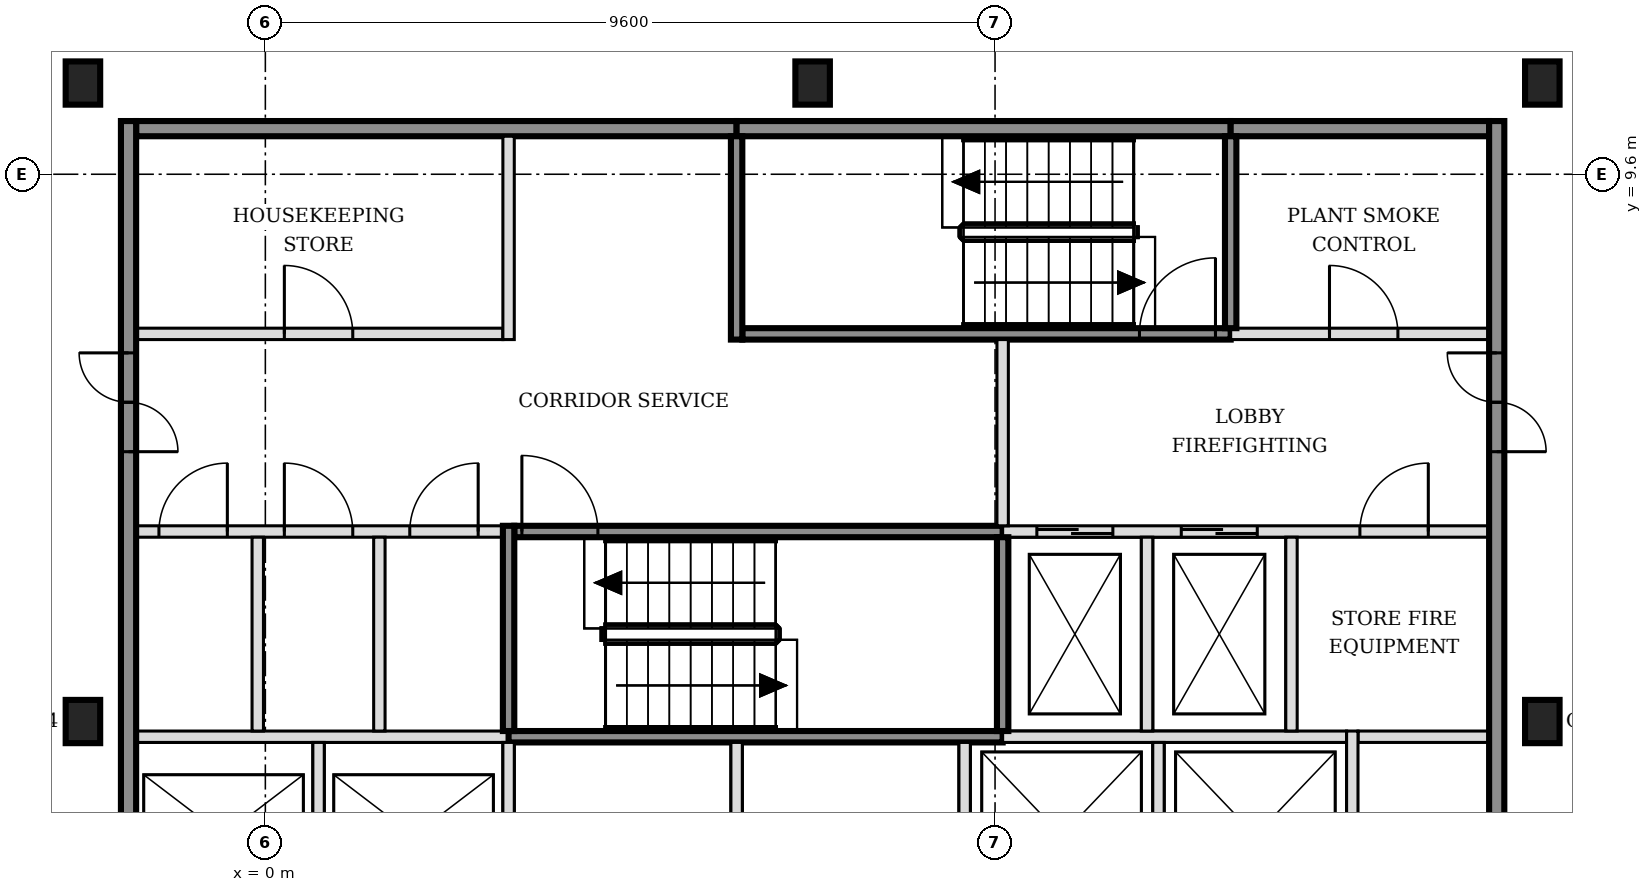
"""IFC4 building model, lengths in metres.
Left out: names, types, materials, properties, quantities, classifications, styles, units other than length and angle.
Written with IfcOpenShell. Run it as: python <this file> out.ifc"""

import sys

from ifc_helpers import new_model, si_unit, direction, frame, frame_2d, origin, origin_2d, place, context, subcontext, project, spatial, rectangle, i_section, extrude, element, fill, save


model = new_model("IFC4")
c1 = context("Model", 3, precision=1e-05, world=origin(), true_north=direction((0.0, 1.0)))
c2 = subcontext(c1, "Body", "Model", "MODEL_VIEW")
j1 = project(units=[si_unit("LENGTHUNIT", "METRE"), si_unit("PLANEANGLEUNIT", "RADIAN")], contexts=[c1])
p1 = place(None, origin())
s1 = spatial("IfcSite", under=j1, at=p1, CompositionType="ELEMENT")
p2 = place(p1, origin())
s2 = spatial("IfcBuilding", under=s1, at=p2, CompositionType="ELEMENT")
p3 = place(p2, frame((0.0, 0.0, 9.0)))
s3 = spatial("IfcBuildingStorey", under=s2, at=p3, CompositionType="ELEMENT", Elevation=9.0)
for number, where, z_axis, x_axis in (
    (1, (-2.4, 2.4, -0.2), (0.0, 0.0, 1.0), (1.0, 0.0, 0.0)),
    (2, (16.8, 2.4, -0.2), (0.0, 0.0, 1.0), (1.0, 0.0, 0.0)),
    (3, (-2.4, 10.8, -0.2), (0.0, 0.0, 1.0), (1.0, 0.0, 0.0)),
    (4, (7.2, 10.8, -0.2), (0.0, 0.0, 1.0), (1.0, 0.0, 0.0)),
    (5, (16.8, 10.8, -0.2), (0.0, 0.0, 1.0), (1.0, 0.0, 0.0)),
):
    element("IfcColumn", number, at=place(p3, frame(where, z_axis=z_axis, x_axis=x_axis)), inside=s3, PredefinedType="COLUMN", context=c2, shape_type="SweptSolid", body=[
        extrude(i_section(OverallWidth=0.454, OverallDepth=0.569, WebThickness=0.078, FlangeThickness=0.125, FilletRadius=0.015, at=origin_2d()), origin(), (0.0, 0.0, 1.0), 6.0),
    ])
p4 = place(p3, frame((-1.7, 2.2, 0.0), z_axis=(0.0, 0.0, 1.0), x_axis=(1.0, 0.0, 0.0)))
e6 = element("IfcWall", 6, at=p4, inside=s3, PredefinedType="SOLIDWALL", context=c2, shape_type="SweptSolid", body=[
    extrude(rectangle(XDim=4.9, YDim=0.15, at=frame_2d((2.45, 0.0))), origin(), (0.0, 0.0, 1.0), 5.8),
])
p5 = place(p3, frame((3.2, 2.2, 0.0), z_axis=(0.0, 0.0, 1.0), x_axis=(1.0, 0.0, 0.0)))
e7 = element("IfcWall", 7, at=p5, inside=s3, PredefinedType="SOLIDWALL", context=c2, shape_type="SweptSolid", body=[
    extrude(rectangle(XDim=6.5, YDim=0.15, at=frame_2d((3.25, 0.0))), origin(), (0.0, 0.0, 1.0), 5.8),
])
p6 = place(p3, frame((9.7, 2.2, 0.0), z_axis=(0.0, 0.0, 1.0), x_axis=(1.0, 0.0, 0.0)))
e8 = element("IfcWall", 8, at=p6, inside=s3, PredefinedType="SOLIDWALL", context=c2, shape_type="SweptSolid", body=[
    extrude(rectangle(XDim=4.525, YDim=0.15, at=frame_2d((2.263, 0.0))), origin(), (0.0, 0.0, 1.0), 5.8),
])
p7 = place(p3, frame((14.375, 2.2, 0.0), z_axis=(0.0, 0.0, 1.0), x_axis=(1.0, 0.0, 0.0)))
e9 = element("IfcWall", 9, at=p7, inside=s3, PredefinedType="PARTITIONING", context=c2, shape_type="SweptSolid", body=[
    extrude(rectangle(XDim=1.725, YDim=0.15, at=frame_2d((0.863, 0.0))), origin(), (0.0, 0.0, 1.0), 5.8),
])
p8 = place(p3, frame((-1.7, 4.9, 0.0), z_axis=(0.0, 0.0, 1.0), x_axis=(1.0, 0.0, 0.0)))
e10 = element("IfcWall", 10, at=p8, inside=s3, PredefinedType="PARTITIONING", context=c2, shape_type="SweptSolid", body=[
    extrude(rectangle(XDim=4.825, YDim=0.15, at=frame_2d((2.413, 0.0))), origin(), (0.0, 0.0, 1.0), 5.8),
])
p9 = place(p8, frame((0.3, 0.0, 0.0)))
e11 = element("IfcOpeningElement", 11, at=p9, cuts=e10, PredefinedType="OPENING", context=c2, shape_type="SweptSolid", body=[
    extrude(rectangle(XDim=0.9, YDim=2.1, at=frame_2d((0.45, 1.05))), frame((0.0, 0.085, 0.0), z_axis=(0.0, -1.0, 0.0), x_axis=(1.0, 0.0, 0.0)), (0.0, 0.0, 1.0), 0.17),
])
p10 = place(p8, frame((1.95, 0.0, 0.0)))
e12 = element("IfcOpeningElement", 12, at=p10, cuts=e10, PredefinedType="OPENING", context=c2, shape_type="SweptSolid", body=[
    extrude(rectangle(XDim=0.9, YDim=2.1, at=frame_2d((0.45, 1.05))), frame((0.0, 0.085, 0.0), z_axis=(0.0, -1.0, 0.0), x_axis=(1.0, 0.0, 0.0)), (0.0, 0.0, 1.0), 0.17),
])
p11 = place(p8, frame((3.6, 0.0, 0.0)))
e13 = element("IfcOpeningElement", 13, at=p11, cuts=e10, PredefinedType="OPENING", context=c2, shape_type="SweptSolid", body=[
    extrude(rectangle(XDim=0.9, YDim=2.1, at=frame_2d((0.45, 1.05))), frame((0.0, 0.085, 0.0), z_axis=(0.0, -1.0, 0.0), x_axis=(1.0, 0.0, 0.0)), (0.0, 0.0, 1.0), 0.17),
])
p12 = place(p3, frame((3.275, 4.9, 0.0), z_axis=(0.0, 0.0, 1.0), x_axis=(1.0, 0.0, 0.0)))
e14 = element("IfcWall", 14, at=p12, inside=s3, PredefinedType="SOLIDWALL", context=c2, shape_type="SweptSolid", body=[
    extrude(rectangle(XDim=6.425, YDim=0.15, at=frame_2d((3.212, 0.0))), origin(), (0.0, 0.0, 1.0), 5.8),
])
p13 = place(p12, frame((0.1, 0.0, 0.0)))
e15 = element("IfcOpeningElement", 15, at=p13, cuts=e14, PredefinedType="OPENING", context=c2, shape_type="SweptSolid", body=[
    extrude(rectangle(XDim=1.0, YDim=2.1, at=frame_2d((0.5, 1.05))), frame((0.0, 0.085, 0.0), z_axis=(0.0, -1.0, 0.0), x_axis=(1.0, 0.0, 0.0)), (0.0, 0.0, 1.0), 0.17),
])
p14 = place(p3, frame((9.7, 4.9, 0.0), z_axis=(0.0, 0.0, 1.0), x_axis=(1.0, 0.0, 0.0)))
e16 = element("IfcWall", 16, at=p14, inside=s3, PredefinedType="SOLIDWALL", context=c2, shape_type="SweptSolid", body=[
    extrude(rectangle(XDim=6.4, YDim=0.15, at=frame_2d((3.2, 0.0))), origin(), (0.0, 0.0, 1.0), 5.8),
])
p15 = place(p14, frame((0.45, 0.0, 0.0)))
e17 = element("IfcOpeningElement", 17, at=p15, cuts=e16, PredefinedType="OPENING", context=c2, shape_type="SweptSolid", body=[
    extrude(rectangle(XDim=1.0, YDim=2.1, at=frame_2d((0.5, 1.05))), frame((0.0, 0.085, 0.0), z_axis=(0.0, -1.0, 0.0), x_axis=(1.0, 0.0, 0.0)), (0.0, 0.0, 1.0), 0.17),
])
p16 = place(p14, frame((2.35, 0.0, 0.0)))
e18 = element("IfcOpeningElement", 18, at=p16, cuts=e16, PredefinedType="OPENING", context=c2, shape_type="SweptSolid", body=[
    extrude(rectangle(XDim=1.0, YDim=2.1, at=frame_2d((0.5, 1.05))), frame((0.0, 0.085, 0.0), z_axis=(0.0, -1.0, 0.0), x_axis=(1.0, 0.0, 0.0)), (0.0, 0.0, 1.0), 0.17),
])
p17 = place(p14, frame((4.7, 0.0, 0.0)))
e19 = element("IfcOpeningElement", 19, at=p17, cuts=e16, PredefinedType="OPENING", context=c2, shape_type="SweptSolid", body=[
    extrude(rectangle(XDim=0.9, YDim=2.1, at=frame_2d((0.45, 1.05))), frame((0.0, 0.085, 0.0), z_axis=(0.0, -1.0, 0.0), x_axis=(1.0, 0.0, 0.0)), (0.0, 0.0, 1.0), 0.17),
])
p18 = place(p3, frame((-1.7, 7.5, 0.0), z_axis=(0.0, 0.0, 1.0), x_axis=(1.0, 0.0, 0.0)))
e20 = element("IfcWall", 20, at=p18, inside=s3, PredefinedType="PARTITIONING", context=c2, shape_type="SweptSolid", body=[
    extrude(rectangle(XDim=4.825, YDim=0.15, at=frame_2d((2.413, 0.0))), origin(), (0.0, 0.0, 1.0), 5.8),
])
p19 = place(p18, frame((1.95, 0.0, 0.0)))
e21 = element("IfcOpeningElement", 21, at=p19, cuts=e20, PredefinedType="OPENING", context=c2, shape_type="SweptSolid", body=[
    extrude(rectangle(XDim=0.9, YDim=2.1, at=frame_2d((0.45, 1.05))), frame((0.0, 0.085, 0.0), z_axis=(0.0, -1.0, 0.0), x_axis=(1.0, 0.0, 0.0)), (0.0, 0.0, 1.0), 0.17),
])
p20 = place(p3, frame((6.275, 7.5, 0.0), z_axis=(0.0, 0.0, 1.0), x_axis=(1.0, 0.0, 0.0)))
e22 = element("IfcWall", 22, at=p20, inside=s3, PredefinedType="SOLIDWALL", context=c2, shape_type="SweptSolid", body=[
    extrude(rectangle(XDim=6.425, YDim=0.15, at=frame_2d((3.212, 0.0))), origin(), (0.0, 0.0, 1.0), 5.8),
])
p21 = place(p20, frame((5.225, 0.0, 0.0)))
e23 = element("IfcOpeningElement", 23, at=p21, cuts=e22, PredefinedType="OPENING", context=c2, shape_type="SweptSolid", body=[
    extrude(rectangle(XDim=1.0, YDim=2.1, at=frame_2d((0.5, 1.05))), frame((0.0, 0.085, 0.0), z_axis=(0.0, -1.0, 0.0), x_axis=(1.0, 0.0, 0.0)), (0.0, 0.0, 1.0), 0.17),
])
p22 = place(p3, frame((12.7, 7.5, 0.0), z_axis=(0.0, 0.0, 1.0), x_axis=(1.0, 0.0, 0.0)))
e24 = element("IfcWall", 24, at=p22, inside=s3, PredefinedType="SOLIDWALL", context=c2, shape_type="SweptSolid", body=[
    extrude(rectangle(XDim=3.4, YDim=0.15, at=frame_2d((1.7, 0.0))), origin(), (0.0, 0.0, 1.0), 5.8),
])
p23 = place(p22, frame((1.3, 0.0, 0.0)))
e25 = element("IfcOpeningElement", 25, at=p23, cuts=e24, PredefinedType="OPENING", context=c2, shape_type="SweptSolid", body=[
    extrude(rectangle(XDim=0.9, YDim=2.1, at=frame_2d((0.45, 1.05))), frame((0.0, 0.085, 0.0), z_axis=(0.0, -1.0, 0.0), x_axis=(1.0, 0.0, 0.0)), (0.0, 0.0, 1.0), 0.17),
])
p24 = place(p3, frame((-1.7, 10.2, 0.0), z_axis=(0.0, 0.0, 1.0), x_axis=(1.0, 0.0, 0.0)))
e26 = element("IfcWall", 26, at=p24, inside=s3, PredefinedType="SOLIDWALL", context=c2, shape_type="SweptSolid", body=[
    extrude(rectangle(XDim=7.9, YDim=0.2, at=frame_2d((3.95, 0.0))), origin(), (0.0, 0.0, 1.0), 5.8),
])
p25 = place(p3, frame((6.2, 10.2, 0.0), z_axis=(0.0, 0.0, 1.0), x_axis=(1.0, 0.0, 0.0)))
e27 = element("IfcWall", 27, at=p25, inside=s3, PredefinedType="SOLIDWALL", context=c2, shape_type="SweptSolid", body=[
    extrude(rectangle(XDim=6.5, YDim=0.2, at=frame_2d((3.25, 0.0))), origin(), (0.0, 0.0, 1.0), 5.8),
])
p26 = place(p3, frame((12.7, 10.2, 0.0), z_axis=(0.0, 0.0, 1.0), x_axis=(1.0, 0.0, 0.0)))
e28 = element("IfcWall", 28, at=p26, inside=s3, PredefinedType="SOLIDWALL", context=c2, shape_type="SweptSolid", body=[
    extrude(rectangle(XDim=3.4, YDim=0.2, at=frame_2d((1.7, 0.0))), origin(), (0.0, 0.0, 1.0), 5.8),
])
p27 = place(p3, frame((-1.8, -5.5, 0.0), z_axis=(0.0, 0.0, 1.0), x_axis=(0.0, 1.0, 0.0)))
e29 = element("IfcWall", 29, at=p27, inside=s3, PredefinedType="SOLIDWALL", context=c2, shape_type="SweptSolid", body=[
    extrude(rectangle(XDim=15.8, YDim=0.2, at=frame_2d((7.9, 0.0))), origin(), (0.0, 0.0, 1.0), 5.8),
])
p28 = place(p27, frame((3.05, 0.0, 0.0)))
e30 = element("IfcOpeningElement", 30, at=p28, cuts=e29, PredefinedType="OPENING", context=c2, shape_type="SweptSolid", body=[
    extrude(rectangle(XDim=1.3, YDim=2.1, at=frame_2d((0.65, 1.05))), frame((0.0, 0.11, 0.0), z_axis=(0.0, -1.0, 0.0), x_axis=(1.0, 0.0, 0.0)), (0.0, 0.0, 1.0), 0.22),
])
p29 = place(p27, frame((11.45, 0.0, 0.0)))
e31 = element("IfcOpeningElement", 31, at=p29, cuts=e29, PredefinedType="OPENING", context=c2, shape_type="SweptSolid", body=[
    extrude(rectangle(XDim=1.3, YDim=2.1, at=frame_2d((0.65, 1.05))), frame((0.0, 0.11, 0.0), z_axis=(0.0, -1.0, 0.0), x_axis=(1.0, 0.0, 0.0)), (0.0, 0.0, 1.0), 0.22),
])
p30 = place(p3, frame((-0.1, 2.275, 0.0), z_axis=(0.0, 0.0, 1.0), x_axis=(0.0, 1.0, 0.0)))
e32 = element("IfcWall", 32, at=p30, inside=s3, PredefinedType="PARTITIONING", context=c2, shape_type="SweptSolid", body=[
    extrude(rectangle(XDim=2.55, YDim=0.15, at=frame_2d((1.275, 0.0))), origin(), (0.0, 0.0, 1.0), 5.8),
])
p31 = place(p3, frame((0.7, -0.325, 0.0), z_axis=(0.0, 0.0, 1.0), x_axis=(0.0, 1.0, 0.0)))
e33 = element("IfcWall", 33, at=p31, inside=s3, PredefinedType="SOLIDWALL", context=c2, shape_type="SweptSolid", body=[
    extrude(rectangle(XDim=2.45, YDim=0.15, at=frame_2d((1.225, 0.0))), origin(), (0.0, 0.0, 1.0), 5.8),
])
p32 = place(p3, frame((1.5, 2.275, 0.0), z_axis=(0.0, 0.0, 1.0), x_axis=(0.0, 1.0, 0.0)))
e34 = element("IfcWall", 34, at=p32, inside=s3, PredefinedType="PARTITIONING", context=c2, shape_type="SweptSolid", body=[
    extrude(rectangle(XDim=2.55, YDim=0.15, at=frame_2d((1.275, 0.0))), origin(), (0.0, 0.0, 1.0), 5.8),
])
p33 = place(p3, frame((3.2, -0.325, 0.0), z_axis=(0.0, 0.0, 1.0), x_axis=(0.0, 1.0, 0.0)))
e35 = element("IfcWall", 35, at=p33, inside=s3, PredefinedType="SOLIDWALL", context=c2, shape_type="SweptSolid", body=[
    extrude(rectangle(XDim=2.45, YDim=0.15, at=frame_2d((1.225, 0.0))), origin(), (0.0, 0.0, 1.0), 5.8),
])
p34 = place(p3, frame((3.2, 2.275, 0.0), z_axis=(0.0, 0.0, 1.0), x_axis=(0.0, 1.0, 0.0)))
e36 = element("IfcWall", 36, at=p34, inside=s3, PredefinedType="SOLIDWALL", context=c2, shape_type="SweptSolid", body=[
    extrude(rectangle(XDim=2.7, YDim=0.15, at=frame_2d((1.35, 0.0))), origin(), (0.0, 0.0, 1.0), 5.8),
])
p35 = place(p3, frame((3.2, 7.425, 0.0), z_axis=(0.0, 0.0, 1.0), x_axis=(0.0, 1.0, 0.0)))
e37 = element("IfcWall", 37, at=p35, inside=s3, PredefinedType="PARTITIONING", context=c2, shape_type="SweptSolid", body=[
    extrude(rectangle(XDim=2.675, YDim=0.15, at=frame_2d((1.337, 0.0))), origin(), (0.0, 0.0, 1.0), 5.8),
])
p36 = place(p3, frame((6.2, -0.325, 0.0), z_axis=(0.0, 0.0, 1.0), x_axis=(0.0, 1.0, 0.0)))
e38 = element("IfcWall", 38, at=p36, inside=s3, PredefinedType="SOLIDWALL", context=c2, shape_type="SweptSolid", body=[
    extrude(rectangle(XDim=2.45, YDim=0.15, at=frame_2d((1.225, 0.0))), origin(), (0.0, 0.0, 1.0), 5.8),
])
p37 = place(p3, frame((6.2, 7.425, 0.0), z_axis=(0.0, 0.0, 1.0), x_axis=(0.0, 1.0, 0.0)))
e39 = element("IfcWall", 39, at=p37, inside=s3, PredefinedType="SOLIDWALL", context=c2, shape_type="SweptSolid", body=[
    extrude(rectangle(XDim=2.675, YDim=0.15, at=frame_2d((1.337, 0.0))), origin(), (0.0, 0.0, 1.0), 5.8),
])
p38 = place(p3, frame((9.2, -0.325, 0.0), z_axis=(0.0, 0.0, 1.0), x_axis=(0.0, 1.0, 0.0)))
e40 = element("IfcWall", 40, at=p38, inside=s3, PredefinedType="SOLIDWALL", context=c2, shape_type="SweptSolid", body=[
    extrude(rectangle(XDim=2.45, YDim=0.15, at=frame_2d((1.225, 0.0))), origin(), (0.0, 0.0, 1.0), 5.8),
])
p39 = place(p3, frame((9.7, 2.275, 0.0), z_axis=(0.0, 0.0, 1.0), x_axis=(0.0, 1.0, 0.0)))
e41 = element("IfcWall", 41, at=p39, inside=s3, PredefinedType="SOLIDWALL", context=c2, shape_type="SweptSolid", body=[
    extrude(rectangle(XDim=2.55, YDim=0.15, at=frame_2d((1.275, 0.0))), origin(), (0.0, 0.0, 1.0), 5.8),
])
p40 = place(p3, frame((9.7, 4.975, 0.0), z_axis=(0.0, 0.0, 1.0), x_axis=(0.0, 1.0, 0.0)))
e42 = element("IfcWall", 42, at=p40, inside=s3, PredefinedType="SOLIDWALL", context=c2, shape_type="SweptSolid", body=[
    extrude(rectangle(XDim=2.45, YDim=0.15, at=frame_2d((1.225, 0.0))), origin(), (0.0, 0.0, 1.0), 5.8),
])
p41 = place(p3, frame((11.6, 2.275, 0.0), z_axis=(0.0, 0.0, 1.0), x_axis=(0.0, 1.0, 0.0)))
e43 = element("IfcWall", 43, at=p41, inside=s3, PredefinedType="SOLIDWALL", context=c2, shape_type="SweptSolid", body=[
    extrude(rectangle(XDim=2.55, YDim=0.15, at=frame_2d((1.275, 0.0))), origin(), (0.0, 0.0, 1.0), 5.8),
])
p42 = place(p3, frame((11.75, -0.325, 0.0), z_axis=(0.0, 0.0, 1.0), x_axis=(0.0, 1.0, 0.0)))
e44 = element("IfcWall", 44, at=p42, inside=s3, PredefinedType="SOLIDWALL", context=c2, shape_type="SweptSolid", body=[
    extrude(rectangle(XDim=2.45, YDim=0.15, at=frame_2d((1.225, 0.0))), origin(), (0.0, 0.0, 1.0), 5.8),
])
p43 = place(p3, frame((12.7, 7.575, 0.0), z_axis=(0.0, 0.0, 1.0), x_axis=(0.0, 1.0, 0.0)))
e45 = element("IfcWall", 45, at=p43, inside=s3, PredefinedType="SOLIDWALL", context=c2, shape_type="SweptSolid", body=[
    extrude(rectangle(XDim=2.525, YDim=0.15, at=frame_2d((1.263, 0.0))), origin(), (0.0, 0.0, 1.0), 5.8),
])
p44 = place(p3, frame((13.5, 2.275, 0.0), z_axis=(0.0, 0.0, 1.0), x_axis=(0.0, 1.0, 0.0)))
e46 = element("IfcWall", 46, at=p44, inside=s3, PredefinedType="SOLIDWALL", context=c2, shape_type="SweptSolid", body=[
    extrude(rectangle(XDim=2.55, YDim=0.15, at=frame_2d((1.275, 0.0))), origin(), (0.0, 0.0, 1.0), 5.8),
])
p45 = place(p3, frame((14.3, -0.475, 0.0), z_axis=(0.0, 0.0, 1.0), x_axis=(0.0, 1.0, 0.0)))
e47 = element("IfcWall", 47, at=p45, inside=s3, PredefinedType="SOLIDWALL", context=c2, shape_type="SweptSolid", body=[
    extrude(rectangle(XDim=2.75, YDim=0.15, at=frame_2d((1.375, 0.0))), origin(), (0.0, 0.0, 1.0), 5.8),
])
p46 = place(p3, frame((16.2, -5.5, 0.0), z_axis=(0.0, 0.0, 1.0), x_axis=(0.0, 1.0, 0.0)))
e48 = element("IfcWall", 48, at=p46, inside=s3, PredefinedType="SOLIDWALL", context=c2, shape_type="SweptSolid", body=[
    extrude(rectangle(XDim=15.8, YDim=0.2, at=frame_2d((7.9, 0.0))), origin(), (0.0, 0.0, 1.0), 5.8),
])
p47 = place(p46, frame((3.05, 0.0, 0.0)))
e49 = element("IfcOpeningElement", 49, at=p47, cuts=e48, PredefinedType="OPENING", context=c2, shape_type="SweptSolid", body=[
    extrude(rectangle(XDim=1.3, YDim=2.1, at=frame_2d((0.65, 1.05))), frame((0.0, 0.11, 0.0), z_axis=(0.0, -1.0, 0.0), x_axis=(1.0, 0.0, 0.0)), (0.0, 0.0, 1.0), 0.22),
])
p48 = place(p46, frame((11.45, 0.0, 0.0)))
e50 = element("IfcOpeningElement", 50, at=p48, cuts=e48, PredefinedType="OPENING", context=c2, shape_type="SweptSolid", body=[
    extrude(rectangle(XDim=1.3, YDim=2.1, at=frame_2d((0.65, 1.05))), frame((0.0, 0.11, 0.0), z_axis=(0.0, -1.0, 0.0), x_axis=(1.0, 0.0, 0.0)), (0.0, 0.0, 1.0), 0.22),
])
p49 = place(p15, origin())
e51 = element("IfcDoor", 51, at=p49, inside=s3, OperationType="DOUBLE_DOOR_SLIDING", PredefinedType="DOOR", context=c2, shape_type="SweptSolid", body=[
    extrude(rectangle(XDim=1.0, YDim=2.1, at=frame_2d((0.5, 1.05))), frame((0.0, 0.025, 0.0), z_axis=(0.0, -1.0, 0.0), x_axis=(1.0, 0.0, 0.0)), (0.0, 0.0, 1.0), 0.05),
])
fill(e17, e51)
p50 = place(p16, origin())
e52 = element("IfcDoor", 52, at=p50, inside=s3, OperationType="DOUBLE_DOOR_SLIDING", PredefinedType="DOOR", context=c2, shape_type="SweptSolid", body=[
    extrude(rectangle(XDim=1.0, YDim=2.1, at=frame_2d((0.5, 1.05))), frame((0.0, 0.025, 0.0), z_axis=(0.0, -1.0, 0.0), x_axis=(1.0, 0.0, 0.0)), (0.0, 0.0, 1.0), 0.05),
])
fill(e18, e52)
p51 = place(p13, origin())
e53 = element("IfcDoor", 53, at=p51, inside=s3, OperationType="SINGLE_SWING_LEFT", PredefinedType="DOOR", context=c2, shape_type="SweptSolid", body=[
    extrude(rectangle(XDim=1.0, YDim=2.1, at=frame_2d((0.5, 1.05))), frame((0.0, 0.025, 0.0), z_axis=(0.0, -1.0, 0.0), x_axis=(1.0, 0.0, 0.0)), (0.0, 0.0, 1.0), 0.05),
])
fill(e15, e53)
p52 = place(p21, origin())
e54 = element("IfcDoor", 54, at=p52, inside=s3, OperationType="SINGLE_SWING_RIGHT", PredefinedType="DOOR", context=c2, shape_type="SweptSolid", body=[
    extrude(rectangle(XDim=1.0, YDim=2.1, at=frame_2d((0.5, 1.05))), frame((0.0, 0.025, 0.0), z_axis=(0.0, -1.0, 0.0), x_axis=(1.0, 0.0, 0.0)), (0.0, 0.0, 1.0), 0.05),
])
fill(e23, e54)
p53 = place(p29, origin())
e55 = element("IfcDoor", 55, at=p53, inside=s3, OperationType="DOUBLE_DOOR_SINGLE_SWING", PredefinedType="DOOR", context=c2, shape_type="SweptSolid", body=[
    extrude(rectangle(XDim=1.3, YDim=2.1, at=frame_2d((0.65, 1.05))), frame((0.0, 0.025, 0.0), z_axis=(0.0, -1.0, 0.0), x_axis=(1.0, 0.0, 0.0)), (0.0, 0.0, 1.0), 0.05),
])
fill(e31, e55)
p54 = place(p48, origin())
e56 = element("IfcDoor", 56, at=p54, inside=s3, OperationType="DOUBLE_DOOR_SINGLE_SWING", PredefinedType="DOOR", context=c2, shape_type="SweptSolid", body=[
    extrude(rectangle(XDim=1.3, YDim=2.1, at=frame_2d((0.65, 1.05))), frame((0.0, 0.025, 0.0), z_axis=(0.0, -1.0, 0.0), x_axis=(1.0, 0.0, 0.0)), (0.0, 0.0, 1.0), 0.05),
])
fill(e50, e56)
p55 = place(p17, origin())
e57 = element("IfcDoor", 57, at=p55, inside=s3, OperationType="SINGLE_SWING_RIGHT", PredefinedType="DOOR", context=c2, shape_type="SweptSolid", body=[
    extrude(rectangle(XDim=0.9, YDim=2.1, at=frame_2d((0.45, 1.05))), frame((0.0, 0.025, 0.0), z_axis=(0.0, -1.0, 0.0), x_axis=(1.0, 0.0, 0.0)), (0.0, 0.0, 1.0), 0.05),
])
fill(e19, e57)
p56 = place(p23, origin())
e58 = element("IfcDoor", 58, at=p56, inside=s3, OperationType="SINGLE_SWING_LEFT", PredefinedType="DOOR", context=c2, shape_type="SweptSolid", body=[
    extrude(rectangle(XDim=0.9, YDim=2.1, at=frame_2d((0.45, 1.05))), frame((0.0, 0.025, 0.0), z_axis=(0.0, -1.0, 0.0), x_axis=(1.0, 0.0, 0.0)), (0.0, 0.0, 1.0), 0.05),
])
fill(e25, e58)
p57 = place(p9, origin())
e59 = element("IfcDoor", 59, at=p57, inside=s3, OperationType="SINGLE_SWING_RIGHT", PredefinedType="DOOR", context=c2, shape_type="SweptSolid", body=[
    extrude(rectangle(XDim=0.9, YDim=2.1, at=frame_2d((0.45, 1.05))), frame((0.0, 0.025, 0.0), z_axis=(0.0, -1.0, 0.0), x_axis=(1.0, 0.0, 0.0)), (0.0, 0.0, 1.0), 0.05),
])
fill(e11, e59)
p58 = place(p10, origin())
e60 = element("IfcDoor", 60, at=p58, inside=s3, OperationType="SINGLE_SWING_LEFT", PredefinedType="DOOR", context=c2, shape_type="SweptSolid", body=[
    extrude(rectangle(XDim=0.9, YDim=2.1, at=frame_2d((0.45, 1.05))), frame((0.0, 0.025, 0.0), z_axis=(0.0, -1.0, 0.0), x_axis=(1.0, 0.0, 0.0)), (0.0, 0.0, 1.0), 0.05),
])
fill(e12, e60)
p59 = place(p11, origin())
e61 = element("IfcDoor", 61, at=p59, inside=s3, OperationType="SINGLE_SWING_RIGHT", PredefinedType="DOOR", context=c2, shape_type="SweptSolid", body=[
    extrude(rectangle(XDim=0.9, YDim=2.1, at=frame_2d((0.45, 1.05))), frame((0.0, 0.025, 0.0), z_axis=(0.0, -1.0, 0.0), x_axis=(1.0, 0.0, 0.0)), (0.0, 0.0, 1.0), 0.05),
])
fill(e13, e61)
p60 = place(p19, origin())
e62 = element("IfcDoor", 62, at=p60, inside=s3, OperationType="SINGLE_SWING_LEFT", PredefinedType="DOOR", context=c2, shape_type="SweptSolid", body=[
    extrude(rectangle(XDim=0.9, YDim=2.1, at=frame_2d((0.45, 1.05))), frame((0.0, 0.025, 0.0), z_axis=(0.0, -1.0, 0.0), x_axis=(1.0, 0.0, 0.0)), (0.0, 0.0, 1.0), 0.05),
])
fill(e21, e62)
save(model, sys.argv[1])
